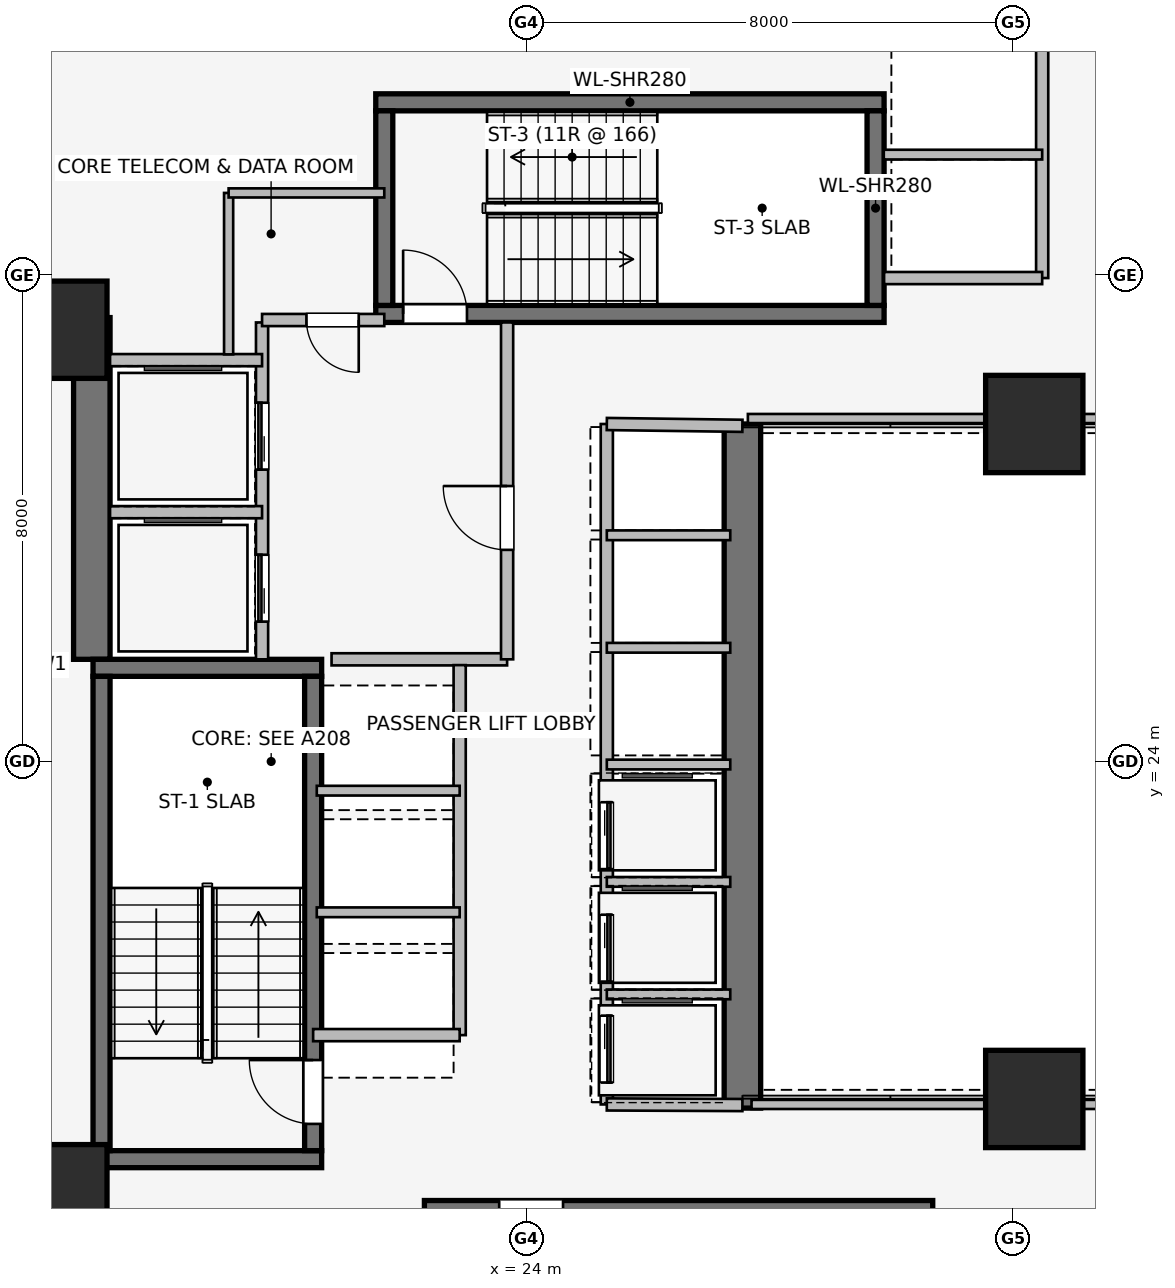
"""IFC4 building model, lengths in metres.
Left out: names, types, materials, properties, quantities, classifications, styles, units other than length and angle.
Written with IfcOpenShell. Run it as: python <this file> out.ifc"""

import sys

from ifc_helpers import new_model, si_unit, direction, frame, frame_2d, origin, origin_2d, place, context, subcontext, project, spatial, rectangle, extrude, element, fill, save


model = new_model("IFC4")
c1 = context("Model", 3, precision=1e-05, world=origin(), true_north=direction((0.0, 1.0)))
c2 = subcontext(c1, "Body", "Model", "MODEL_VIEW")
j1 = project(units=[si_unit("LENGTHUNIT", "METRE"), si_unit("PLANEANGLEUNIT", "RADIAN")], contexts=[c1])
p1 = place(None, origin())
s1 = spatial("IfcSite", under=j1, at=p1, CompositionType="ELEMENT")
p2 = place(p1, origin())
s2 = spatial("IfcBuilding", under=s1, at=p2, CompositionType="ELEMENT")
p3 = place(p2, frame((0.0, 0.0, 27.0)))
s3 = spatial("IfcBuildingStorey", under=s2, at=p3, CompositionType="ELEMENT", Elevation=27.0)
p4 = place(p3, frame((16.85, 25.68, 0.0), z_axis=(0.0, 0.0, 1.0), x_axis=(0.0, 1.0, 0.0)))
e1 = element("IfcWall", 1, at=p4, inside=s3, PredefinedType="SHEAR", context=c2, shape_type="SweptSolid", body=[
    extrude(rectangle(XDim=5.62, YDim=0.6, at=frame_2d((2.81, 0.0))), origin(), (0.0, 0.0, 1.0), 3.65),
])
p5 = place(p3, frame((27.55, 29.55, 0.0), z_axis=(0.0, 0.0, 1.0), x_axis=(0.0, -1.0, 0.0)))
e2 = element("IfcWall", 2, at=p5, inside=s3, PredefinedType="SHEAR", context=c2, shape_type="SweptSolid", body=[
    extrude(rectangle(XDim=11.25, YDim=0.6, at=frame_2d((5.625, 0.0))), origin(), (0.0, 0.0, 1.0), 3.65),
])
for number, where, z_axis, x_axis in (
    (3, (16.87, 17.46, 0.0), (0.0, 0.0, 1.0), (1.0, 0.0, 0.0)),
    (4, (20.63, 25.54, 0.0), (0.0, 0.0, 1.0), (-1.0, 0.0, 0.0)),
):
    element("IfcWall", number, at=place(p3, frame(where, z_axis=z_axis, x_axis=x_axis)), inside=s3, PredefinedType="SHEAR", context=c2, shape_type="SweptSolid", body=[
        extrude(rectangle(XDim=3.76, YDim=0.28, at=frame_2d((1.88, 0.0))), origin(), (0.0, 0.0, 1.0), 3.65),
    ])
p6 = place(p3, frame((17.01, 25.4, 0.0), z_axis=(0.0, 0.0, 1.0), x_axis=(0.0, -1.0, 0.0)))
e5 = element("IfcWall", 5, at=p6, inside=s3, PredefinedType="SHEAR", context=c2, shape_type="SweptSolid", body=[
    extrude(rectangle(XDim=7.8, YDim=0.28, at=frame_2d((3.9, 0.0))), origin(), (0.0, 0.0, 1.0), 3.65),
])
p7 = place(p3, frame((20.49, 17.6, 0.0), z_axis=(0.0, 0.0, 1.0), x_axis=(0.0, 1.0, 0.0)))
e6 = element("IfcWall", 6, at=p7, inside=s3, PredefinedType="SHEAR", context=c2, shape_type="SweptSolid", body=[
    extrude(rectangle(XDim=7.8, YDim=0.28, at=frame_2d((3.9, 0.0))), origin(), (0.0, 0.0, 1.0), 3.65),
])
p8 = place(p7, frame((0.44, 0.0, 0.0)))
e7 = element("IfcOpeningElement", 7, at=p8, cuts=e6, PredefinedType="OPENING", context=c2, shape_type="SweptSolid", body=[
    extrude(rectangle(XDim=1.05, YDim=2.0, at=frame_2d((0.525, 1.0))), frame((0.0, 0.15, 0.0), z_axis=(0.0, -1.0, 0.0), x_axis=(1.0, 0.0, 0.0)), (0.0, 0.0, 1.0), 0.3),
])
p9 = place(p3, frame((30.68, 16.64, 0.0), z_axis=(0.0, 0.0, 1.0), x_axis=(-1.0, 0.0, 0.0)))
e8 = element("IfcWall", 8, at=p9, inside=s3, PredefinedType="SHEAR", context=c2, shape_type="SweptSolid", body=[
    extrude(rectangle(XDim=8.36, YDim=0.28, at=frame_2d((4.18, 0.0))), origin(), (0.0, 0.0, 1.0), 3.65),
])
p10 = place(p9, frame((6.08, 0.0, 0.0)))
e9 = element("IfcOpeningElement", 9, at=p10, cuts=e8, PredefinedType="OPENING", context=c2, shape_type="SweptSolid", body=[
    extrude(rectangle(XDim=1.05, YDim=2.0, at=frame_2d((0.525, 1.0))), frame((0.0, 0.15, 0.0), z_axis=(0.0, -1.0, 0.0), x_axis=(1.0, 0.0, 0.0)), (0.0, 0.0, 1.0), 0.3),
])
p11 = place(p3, frame((21.52, 31.36, 0.0), z_axis=(0.0, 0.0, 1.0), x_axis=(1.0, 0.0, 0.0)))
e10 = element("IfcWall", 10, at=p11, inside=s3, PredefinedType="SHEAR", context=c2, shape_type="SweptSolid", body=[
    extrude(rectangle(XDim=8.36, YDim=0.28, at=frame_2d((4.18, 0.0))), origin(), (0.0, 0.0, 1.0), 3.65),
])
p12 = place(p11, frame((0.45, 0.0, 0.0)))
e11 = element("IfcOpeningElement", 11, at=p12, cuts=e10, PredefinedType="OPENING", context=c2, shape_type="SweptSolid", body=[
    extrude(rectangle(XDim=1.05, YDim=2.0, at=frame_2d((0.525, 1.0))), frame((0.0, 0.15, 0.0), z_axis=(0.0, -1.0, 0.0), x_axis=(1.0, 0.0, 0.0)), (0.0, 0.0, 1.0), 0.3),
])
p13 = place(p3, frame((29.88, 34.84, 0.0), z_axis=(0.0, 0.0, 1.0), x_axis=(-1.0, 0.0, 0.0)))
e12 = element("IfcWall", 12, at=p13, inside=s3, PredefinedType="SHEAR", context=c2, shape_type="SweptSolid", body=[
    extrude(rectangle(XDim=8.36, YDim=0.28, at=frame_2d((4.18, 0.0))), origin(), (0.0, 0.0, 1.0), 3.65),
])
for number, where, z_axis, x_axis in (
    (13, (21.66, 34.7, 0.0), (0.0, 0.0, 1.0), (0.0, -1.0, 0.0)),
    (14, (29.74, 31.5, 0.0), (0.0, 0.0, 1.0), (0.0, 1.0, 0.0)),
):
    element("IfcWall", number, at=place(p3, frame(where, z_axis=z_axis, x_axis=x_axis)), inside=s3, PredefinedType="SHEAR", context=c2, shape_type="SweptSolid", body=[
        extrude(rectangle(XDim=3.2, YDim=0.28, at=frame_2d((1.6, 0.0))), origin(), (0.0, 0.0, 1.0), 3.65),
    ])
for number, where, z_axis, x_axis in (
    (15, (16.3, 16.9, 0.0), (0.0, 0.0, 1.0), (1.0, 0.0, 0.0)),
    (16, (16.3, 31.1, 0.0), (0.0, 0.0, 1.0), (1.0, 0.0, 0.0)),
    (17, (32.35, 18.45, 0.0), (0.0, 0.0, 1.0), (1.0, 0.0, 0.0)),
    (18, (32.35, 29.55, 0.0), (0.0, 0.0, 1.0), (1.0, 0.0, 0.0)),
):
    element("IfcColumn", number, at=place(p3, frame(where, z_axis=z_axis, x_axis=x_axis)), inside=s3, PredefinedType="COLUMN", context=c2, shape_type="SweptSolid", body=[
        extrude(rectangle(XDim=1.6, YDim=1.6, at=origin_2d()), origin(), (0.0, 0.0, 1.0), 3.65),
    ])
p14 = place(p3, frame((19.65, 25.68, 0.0), z_axis=(0.0, 0.0, 1.0), x_axis=(0.0, 1.0, 0.0)))
e19 = element("IfcWall", 19, at=p14, inside=s3, PredefinedType="PARTITIONING", context=c2, shape_type="SweptSolid", body=[
    extrude(rectangle(XDim=5.54, YDim=0.2, at=frame_2d((2.77, 0.0))), origin(), (0.0, 0.0, 1.0), 3.39),
])
p15 = place(p14, frame((0.62, 0.0, 0.0)))
e20 = element("IfcOpeningElement", 20, at=p15, cuts=e19, PredefinedType="OPENING", context=c2, shape_type="SweptSolid", body=[
    extrude(rectangle(XDim=1.1, YDim=2.2, at=frame_2d((0.55, 1.1))), frame((0.0, 0.11, 0.0), z_axis=(0.0, -1.0, 0.0), x_axis=(1.0, 0.0, 0.0)), (0.0, 0.0, 1.0), 0.22),
])
p16 = place(p14, frame((3.12, 0.0, 0.0)))
e21 = element("IfcOpeningElement", 21, at=p16, cuts=e19, PredefinedType="OPENING", context=c2, shape_type="SweptSolid", body=[
    extrude(rectangle(XDim=1.1, YDim=2.2, at=frame_2d((0.55, 1.1))), frame((0.0, 0.11, 0.0), z_axis=(0.0, -1.0, 0.0), x_axis=(1.0, 0.0, 0.0)), (0.0, 0.0, 1.0), 0.22),
])
p17 = place(p3, frame((20.793, 25.68, 0.0), z_axis=(0.0, 0.0, 1.0), x_axis=(1.0, 0.0, 0.0)))
e22 = element("IfcWall", 22, at=p17, inside=s3, PredefinedType="PARTITIONING", context=c2, shape_type="SweptSolid", body=[
    extrude(rectangle(XDim=2.887, YDim=0.2, at=frame_2d((1.443, 0.0))), origin(), (0.0, 0.0, 1.0), 3.39),
])
p18 = place(p3, frame((23.68, 25.68, 0.0), z_axis=(0.0, 0.0, 1.0), x_axis=(0.0, 1.0, 0.0)))
e23 = element("IfcWall", 23, at=p18, inside=s3, PredefinedType="PARTITIONING", context=c2, shape_type="SweptSolid", body=[
    extrude(rectangle(XDim=5.54, YDim=0.2, at=frame_2d((2.77, 0.0))), origin(), (0.0, 0.0, 1.0), 3.39),
])
p19 = place(p18, frame((1.8, 0.0, 0.0)))
e24 = element("IfcOpeningElement", 24, at=p19, cuts=e23, PredefinedType="OPENING", context=c2, shape_type="SweptSolid", body=[
    extrude(rectangle(XDim=1.05, YDim=2.0, at=frame_2d((0.525, 1.0))), frame((0.0, 0.11, 0.0), z_axis=(0.0, -1.0, 0.0), x_axis=(1.0, 0.0, 0.0)), (0.0, 0.0, 1.0), 0.22),
])
p20 = place(p3, frame((21.66, 31.26, 0.0), z_axis=(0.0, 0.0, 1.0), x_axis=(-1.0, 0.0, 0.0)))
e25 = element("IfcWall", 25, at=p20, inside=s3, PredefinedType="PARTITIONING", context=c2, shape_type="SweptSolid", body=[
    extrude(rectangle(XDim=2.01, YDim=0.2, at=frame_2d((1.005, 0.0))), origin(), (0.0, 0.0, 1.0), 3.39),
])
p21 = place(p20, frame((0.42, 0.0, 0.0)))
e26 = element("IfcOpeningElement", 26, at=p21, cuts=e25, PredefinedType="OPENING", context=c2, shape_type="SweptSolid", body=[
    extrude(rectangle(XDim=0.86, YDim=2.0, at=frame_2d((0.43, 1.0))), frame((0.0, 0.11, 0.0), z_axis=(0.0, -1.0, 0.0), x_axis=(1.0, 0.0, 0.0)), (0.0, 0.0, 1.0), 0.22),
])
p22 = place(p3, frame((17.15, 28.1, 0.0), z_axis=(0.0, 0.0, 1.0), x_axis=(1.0, 0.0, 0.0)))
e27 = element("IfcWall", 27, at=p22, inside=s3, PredefinedType="PARTITIONING", context=c2, shape_type="SweptSolid", body=[
    extrude(rectangle(XDim=2.5, YDim=0.2, at=frame_2d((1.25, 0.0))), origin(), (0.0, 0.0, 1.0), 3.39),
])
p23 = place(p3, frame((19.65, 30.6, 0.0), z_axis=(0.0, 0.0, 1.0), x_axis=(-1.0, 0.0, 0.0)))
e28 = element("IfcWall", 28, at=p23, inside=s3, PredefinedType="PARTITIONING", context=c2, shape_type="SweptSolid", body=[
    extrude(rectangle(XDim=2.5, YDim=0.2, at=frame_2d((1.25, 0.0))), origin(), (0.0, 0.0, 1.0), 2.29),
])
p24 = place(p3, frame((32.48, 31.95, 0.0), z_axis=(0.0, 0.0, 1.0), x_axis=(0.0, 1.0, 0.0)))
e29 = element("IfcWall", 29, at=p24, inside=s3, PredefinedType="PARTITIONING", context=c2, shape_type="SweptSolid", body=[
    extrude(rectangle(XDim=4.05, YDim=0.2, at=frame_2d((2.025, 0.0))), origin(), (0.0, 0.0, 1.0), 2.513),
])
p25 = place(p3, frame((32.48, 31.95, 0.0), z_axis=(0.0, 0.0, 1.0), x_axis=(-1.0, 0.0, 0.0)))
e30 = element("IfcWall", 30, at=p25, inside=s3, PredefinedType="PARTITIONING", context=c2, shape_type="SweptSolid", body=[
    extrude(rectangle(XDim=2.6, YDim=0.2, at=frame_2d((1.3, 0.0))), origin(), (0.0, 0.0, 1.0), 3.39),
])
p26 = place(p3, frame((29.875, 33.98, 0.0), z_axis=(0.0, 0.0, 1.0), x_axis=(1.0, 0.0, 0.0)))
e31 = element("IfcWall", 31, at=p26, inside=s3, PredefinedType="PARTITIONING", context=c2, shape_type="SweptSolid", body=[
    extrude(rectangle(XDim=2.605, YDim=0.16, at=frame_2d((1.302, 0.0))), origin(), (0.0, 0.0, 1.0), 3.39),
])
p27 = place(p3, frame((22.9, 19.5, 0.0), z_axis=(0.0, 0.0, 1.0), x_axis=(0.0, 1.0, 0.0)))
e32 = element("IfcWall", 32, at=p27, inside=s3, PredefinedType="PARTITIONING", context=c2, shape_type="SweptSolid", body=[
    extrude(rectangle(XDim=6.085, YDim=0.2, at=frame_2d((3.042, 0.0))), origin(), (0.0, 0.0, 1.0), 3.39),
])
p28 = place(p3, frame((20.49, 19.5, 0.0), z_axis=(0.0, 0.0, 1.0), x_axis=(1.0, 0.0, 0.0)))
e33 = element("IfcWall", 33, at=p28, inside=s3, PredefinedType="PARTITIONING", context=c2, shape_type="SweptSolid", body=[
    extrude(rectangle(XDim=2.41, YDim=0.2, at=frame_2d((1.205, 0.0))), origin(), (0.0, 0.0, 1.0), 2.29),
])
for number, where, z_axis, x_axis in (
    (34, (20.55, 21.52, 0.0), (0.0, 0.0, 1.0), (1.0, 0.0, 0.0)),
    (35, (20.55, 23.52, 0.0), (0.0, 0.0, 1.0), (1.0, 0.0, 0.0)),
):
    element("IfcWall", number, at=place(p3, frame(where, z_axis=z_axis, x_axis=x_axis)), inside=s3, PredefinedType="PARTITIONING", context=c2, shape_type="SweptSolid", body=[
        extrude(rectangle(XDim=2.35, YDim=0.16, at=frame_2d((1.175, 0.0))), origin(), (0.0, 0.0, 1.0), 3.39),
    ])
p29 = place(p3, frame((25.32, 29.55, 0.0), z_axis=(0.0, 0.0, 1.0), x_axis=(0.0, -1.0, 0.0)))
e36 = element("IfcWall", 36, at=p29, inside=s3, PredefinedType="PARTITIONING", context=c2, shape_type="SweptSolid", body=[
    extrude(rectangle(XDim=11.19, YDim=0.2, at=frame_2d((5.595, 0.0))), origin(), (0.0, 0.0, 1.0), 3.39),
])
p30 = place(p29, frame((6.22, 0.0, 0.0)))
e37 = element("IfcOpeningElement", 37, at=p30, cuts=e36, PredefinedType="OPENING", context=c2, shape_type="SweptSolid", body=[
    extrude(rectangle(XDim=1.1, YDim=2.2, at=frame_2d((0.55, 1.1))), frame((0.0, 0.11, 0.0), z_axis=(0.0, -1.0, 0.0), x_axis=(1.0, 0.0, 0.0)), (0.0, 0.0, 1.0), 0.22),
])
p31 = place(p29, frame((8.07, 0.0, 0.0)))
e38 = element("IfcOpeningElement", 38, at=p31, cuts=e36, PredefinedType="OPENING", context=c2, shape_type="SweptSolid", body=[
    extrude(rectangle(XDim=1.1, YDim=2.2, at=frame_2d((0.55, 1.1))), frame((0.0, 0.11, 0.0), z_axis=(0.0, -1.0, 0.0), x_axis=(1.0, 0.0, 0.0)), (0.0, 0.0, 1.0), 0.22),
])
p32 = place(p29, frame((9.73, 0.0, 0.0)))
e39 = element("IfcOpeningElement", 39, at=p32, cuts=e36, PredefinedType="OPENING", context=c2, shape_type="SweptSolid", body=[
    extrude(rectangle(XDim=1.1, YDim=2.2, at=frame_2d((0.55, 1.1))), frame((0.0, 0.11, 0.0), z_axis=(0.0, -1.0, 0.0), x_axis=(1.0, 0.0, 0.0)), (0.0, 0.0, 1.0), 0.22),
])
p33 = place(p3, frame((25.32, 18.36, 0.0), z_axis=(0.0, 0.0, 1.0), x_axis=(0.999989925833, -0.004488678231, 0.0)))
e40 = element("IfcWall", 40, at=p33, inside=s3, PredefinedType="PARTITIONING", context=c2, shape_type="SweptSolid", body=[
    extrude(rectangle(XDim=2.23, YDim=0.2, at=frame_2d((1.115, 0.0))), origin(), (0.0, 0.0, 1.0), 3.39),
])
p34 = place(p3, frame((27.55, 29.52, 0.0), z_axis=(0.0, 0.0, 1.0), x_axis=(-0.999909343457, 0.013464949556, 0.0)))
e41 = element("IfcWall", 41, at=p34, inside=s3, PredefinedType="PARTITIONING", context=c2, shape_type="SweptSolid", body=[
    extrude(rectangle(XDim=2.23, YDim=0.2, at=frame_2d((1.115, 0.0))), origin(), (0.0, 0.0, 1.0), 2.29),
])
for number, where, z_axis, x_axis in (
    (42, (25.32, 20.17, 0.0), (0.0, 0.0, 1.0), (1.0, 0.0, 0.0)),
    (43, (25.32, 22.02, 0.0), (0.0, 0.0, 1.0), (1.0, 0.0, 0.0)),
    (44, (25.32, 23.95, 0.0), (0.0, 0.0, 1.0), (1.0, 0.0, 0.0)),
    (45, (25.32, 25.87, 0.0), (0.0, 0.0, 1.0), (1.0, 0.0, 0.0)),
    (46, (25.32, 27.72, 0.0), (0.0, 0.0, 1.0), (1.0, 0.0, 0.0)),
):
    element("IfcWall", number, at=place(p3, frame(where, z_axis=z_axis, x_axis=x_axis)), inside=s3, PredefinedType="PARTITIONING", context=c2, shape_type="SweptSolid", body=[
        extrude(rectangle(XDim=2.03, YDim=0.16, at=frame_2d((1.015, 0.0))), origin(), (0.0, 0.0, 1.0), 3.39),
    ])
p35 = place(p3, frame((19.1, 33.35, 0.0), z_axis=(0.0, 0.0, 1.0), x_axis=(0.0, -1.0, 0.0)))
e47 = element("IfcWall", 47, at=p35, inside=s3, PredefinedType="PARTITIONING", context=c2, shape_type="SweptSolid", body=[
    extrude(rectangle(XDim=2.655, YDim=0.15, at=frame_2d((1.328, 0.0))), origin(), (0.0, 0.0, 1.0), 3.39),
])
p36 = place(p3, frame((21.66, 33.35, 0.0), z_axis=(0.0, 0.0, 1.0), x_axis=(-1.0, 0.0, 0.0)))
e48 = element("IfcWall", 48, at=p36, inside=s3, PredefinedType="PARTITIONING", context=c2, shape_type="SweptSolid", body=[
    extrude(rectangle(XDim=2.56, YDim=0.15, at=frame_2d((1.28, 0.0))), origin(), (0.0, 0.0, 1.0), 3.39),
])
p37 = place(p3, frame((27.7, 18.36, 0.0), z_axis=(0.0, 0.0, 1.0), x_axis=(1.0, 0.0, 0.0)))
e49 = element("IfcWall", 49, at=p37, inside=s3, PredefinedType="PARTITIONING", context=c2, shape_type="SweptSolid", body=[
    extrude(rectangle(XDim=12.14, YDim=0.15, at=frame_2d((6.07, 0.0))), origin(), (0.0, 0.0, 1.0), 2.531),
])
p38 = place(p3, frame((39.84, 29.64, 0.0), z_axis=(0.0, 0.0, 1.0), x_axis=(-1.0, 0.0, 0.0)))
e50 = element("IfcWall", 50, at=p38, inside=s3, PredefinedType="PARTITIONING", context=c2, shape_type="SweptSolid", body=[
    extrude(rectangle(XDim=12.2, YDim=0.15, at=frame_2d((6.1, 0.0))), origin(), (0.0, 0.0, 1.0), 2.531),
])
p39 = place(p8, origin())
e51 = element("IfcDoor", 51, at=p39, inside=s3, OperationType="SINGLE_SWING_RIGHT", PredefinedType="DOOR", context=c2, shape_type="SweptSolid", body=[
    extrude(rectangle(XDim=1.05, YDim=2.0, at=frame_2d((0.525, 1.0))), frame((0.0, 0.025, 0.0), z_axis=(0.0, -1.0, 0.0), x_axis=(1.0, 0.0, 0.0)), (0.0, 0.0, 1.0), 0.05),
])
fill(e7, e51)
p40 = place(p10, origin())
e52 = element("IfcDoor", 52, at=p40, inside=s3, OperationType="SINGLE_SWING_RIGHT", PredefinedType="DOOR", context=c2, shape_type="SweptSolid", body=[
    extrude(rectangle(XDim=1.05, YDim=2.0, at=frame_2d((0.525, 1.0))), frame((0.0, 0.025, 0.0), z_axis=(0.0, -1.0, 0.0), x_axis=(1.0, 0.0, 0.0)), (0.0, 0.0, 1.0), 0.05),
])
fill(e9, e52)
p41 = place(p12, origin())
e53 = element("IfcDoor", 53, at=p41, inside=s3, OperationType="SINGLE_SWING_LEFT", PredefinedType="DOOR", context=c2, shape_type="SweptSolid", body=[
    extrude(rectangle(XDim=1.05, YDim=2.0, at=frame_2d((0.525, 1.0))), frame((0.0, 0.025, 0.0), z_axis=(0.0, -1.0, 0.0), x_axis=(1.0, 0.0, 0.0)), (0.0, 0.0, 1.0), 0.05),
])
fill(e11, e53)
p42 = place(p15, origin())
e54 = element("IfcDoor", 54, at=p42, inside=s3, OperationType="SLIDING_TO_LEFT", PredefinedType="DOOR", context=c2, shape_type="SweptSolid", body=[
    extrude(rectangle(XDim=1.1, YDim=2.2, at=frame_2d((0.55, 1.1))), frame((0.0, 0.025, 0.0), z_axis=(0.0, -1.0, 0.0), x_axis=(1.0, 0.0, 0.0)), (0.0, 0.0, 1.0), 0.05),
])
fill(e20, e54)
p43 = place(p16, origin())
e55 = element("IfcDoor", 55, at=p43, inside=s3, OperationType="SLIDING_TO_LEFT", PredefinedType="DOOR", context=c2, shape_type="SweptSolid", body=[
    extrude(rectangle(XDim=1.1, YDim=2.2, at=frame_2d((0.55, 1.1))), frame((0.0, 0.025, 0.0), z_axis=(0.0, -1.0, 0.0), x_axis=(1.0, 0.0, 0.0)), (0.0, 0.0, 1.0), 0.05),
])
fill(e21, e55)
p44 = place(p19, origin())
e56 = element("IfcDoor", 56, at=p44, inside=s3, OperationType="SINGLE_SWING_RIGHT", PredefinedType="DOOR", context=c2, shape_type="SweptSolid", body=[
    extrude(rectangle(XDim=1.05, YDim=2.0, at=frame_2d((0.525, 1.0))), frame((0.0, 0.025, 0.0), z_axis=(0.0, -1.0, 0.0), x_axis=(1.0, 0.0, 0.0)), (0.0, 0.0, 1.0), 0.05),
])
fill(e24, e56)
p45 = place(p21, origin())
e57 = element("IfcDoor", 57, at=p45, inside=s3, OperationType="SINGLE_SWING_LEFT", PredefinedType="DOOR", context=c2, shape_type="SweptSolid", body=[
    extrude(rectangle(XDim=0.86, YDim=2.0, at=frame_2d((0.43, 1.0))), frame((0.0, 0.025, 0.0), z_axis=(0.0, -1.0, 0.0), x_axis=(1.0, 0.0, 0.0)), (0.0, 0.0, 1.0), 0.05),
])
fill(e26, e57)
p46 = place(p30, origin())
e58 = element("IfcDoor", 58, at=p46, inside=s3, OperationType="SLIDING_TO_LEFT", PredefinedType="DOOR", context=c2, shape_type="SweptSolid", body=[
    extrude(rectangle(XDim=1.1, YDim=2.2, at=frame_2d((0.55, 1.1))), frame((0.0, 0.025, 0.0), z_axis=(0.0, -1.0, 0.0), x_axis=(1.0, 0.0, 0.0)), (0.0, 0.0, 1.0), 0.05),
])
fill(e37, e58)
p47 = place(p31, origin())
e59 = element("IfcDoor", 59, at=p47, inside=s3, OperationType="SLIDING_TO_LEFT", PredefinedType="DOOR", context=c2, shape_type="SweptSolid", body=[
    extrude(rectangle(XDim=1.1, YDim=2.2, at=frame_2d((0.55, 1.1))), frame((0.0, 0.025, 0.0), z_axis=(0.0, -1.0, 0.0), x_axis=(1.0, 0.0, 0.0)), (0.0, 0.0, 1.0), 0.05),
])
fill(e38, e59)
p48 = place(p32, origin())
e60 = element("IfcDoor", 60, at=p48, inside=s3, OperationType="SLIDING_TO_LEFT", PredefinedType="DOOR", context=c2, shape_type="SweptSolid", body=[
    extrude(rectangle(XDim=1.1, YDim=2.2, at=frame_2d((0.55, 1.1))), frame((0.0, 0.025, 0.0), z_axis=(0.0, -1.0, 0.0), x_axis=(1.0, 0.0, 0.0)), (0.0, 0.0, 1.0), 0.05),
])
fill(e39, e60)
save(model, sys.argv[1])
